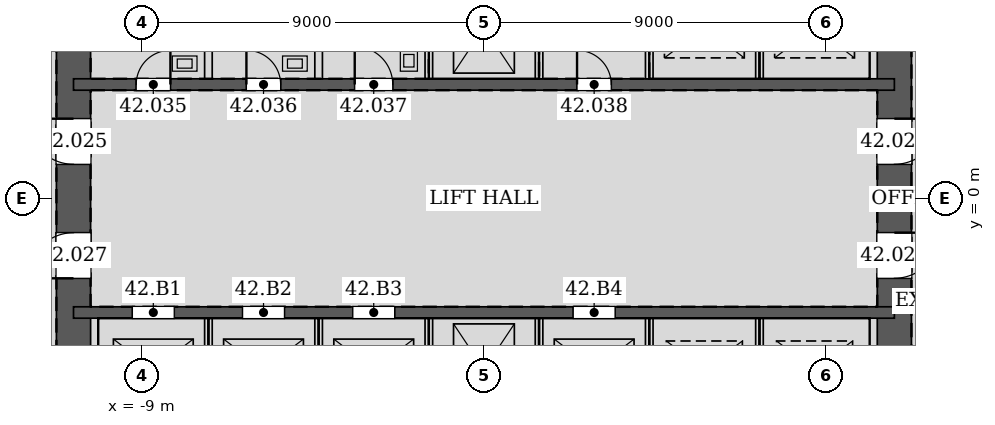
"""IFC4 building model, lengths in metres.
Left out: names, types, materials, properties, quantities, classifications, styles, units other than length and angle.
Written with IfcOpenShell. Run it as: python <this file> out.ifc"""

import sys

from ifc_helpers import new_model, si_unit, direction, frame, frame_2d, origin, place, context, subcontext, project, spatial, rectangle, extrude, element, fill, save


model = new_model("IFC4")
c1 = context("Model", 3, precision=1e-05, world=origin(), true_north=direction((0.0, 1.0)))
c2 = subcontext(c1, "Body", "Model", "MODEL_VIEW")
j1 = project(units=[si_unit("LENGTHUNIT", "METRE"), si_unit("PLANEANGLEUNIT", "RADIAN")], contexts=[c1])
p1 = place(None, origin())
s1 = spatial("IfcSite", under=j1, at=p1, CompositionType="ELEMENT")
p2 = place(p1, origin())
s2 = spatial("IfcBuilding", under=s1, at=p2, CompositionType="ELEMENT")
p3 = place(p2, frame((0.0, 0.0, 184.8)))
s3 = spatial("IfcBuildingStorey", under=s2, at=p3, CompositionType="ELEMENT", Elevation=184.8)
p4 = place(p3, frame((10.8, -10.8, 0.0), z_axis=(0.0, 0.0, 1.0), x_axis=(0.0, 1.0, 0.0)))
e1 = element("IfcWall", 1, at=p4, inside=s3, PredefinedType="SOLIDWALL", context=c2, shape_type="SweptSolid", body=[
    extrude(rectangle(XDim=21.6, YDim=0.9, at=frame_2d((10.8, 0.0))), origin(), (0.0, 0.0, 1.0), 4.2),
])
p5 = place(p4, frame((11.7, 0.0, 0.0)))
e2 = element("IfcOpeningElement", 2, at=p5, cuts=e1, PredefinedType="OPENING", context=c2, shape_type="SweptSolid", body=[
    extrude(rectangle(XDim=1.2, YDim=2.1, at=frame_2d((0.6, 1.05))), frame((0.0, 0.46, 0.0), z_axis=(0.0, -1.0, 0.0), x_axis=(1.0, 0.0, 0.0)), (0.0, 0.0, 1.0), 0.92),
])
p6 = place(p4, frame((8.7, 0.0, 0.0)))
e3 = element("IfcOpeningElement", 3, at=p6, cuts=e1, PredefinedType="OPENING", context=c2, shape_type="SweptSolid", body=[
    extrude(rectangle(XDim=1.2, YDim=2.1, at=frame_2d((0.6, 1.05))), frame((0.0, 0.46, 0.0), z_axis=(0.0, -1.0, 0.0), x_axis=(1.0, 0.0, 0.0)), (0.0, 0.0, 1.0), 0.92),
])
p7 = place(p3, frame((-10.8, 10.8, 0.0), z_axis=(0.0, 0.0, 1.0), x_axis=(0.0, -1.0, 0.0)))
e4 = element("IfcWall", 4, at=p7, inside=s3, PredefinedType="SOLIDWALL", context=c2, shape_type="SweptSolid", body=[
    extrude(rectangle(XDim=21.6, YDim=0.9, at=frame_2d((10.8, 0.0))), origin(), (0.0, 0.0, 1.0), 4.2),
])
p8 = place(p7, frame((8.7, 0.0, 0.0)))
e5 = element("IfcOpeningElement", 5, at=p8, cuts=e4, PredefinedType="OPENING", context=c2, shape_type="SweptSolid", body=[
    extrude(rectangle(XDim=1.2, YDim=2.1, at=frame_2d((0.6, 1.05))), frame((0.0, 0.46, 0.0), z_axis=(0.0, -1.0, 0.0), x_axis=(1.0, 0.0, 0.0)), (0.0, 0.0, 1.0), 0.92),
])
p9 = place(p7, frame((11.7, 0.0, 0.0)))
e6 = element("IfcOpeningElement", 6, at=p9, cuts=e4, PredefinedType="OPENING", context=c2, shape_type="SweptSolid", body=[
    extrude(rectangle(XDim=1.2, YDim=2.1, at=frame_2d((0.6, 1.05))), frame((0.0, 0.46, 0.0), z_axis=(0.0, -1.0, 0.0), x_axis=(1.0, 0.0, 0.0)), (0.0, 0.0, 1.0), 0.92),
])
p10 = place(p3, frame((-10.8, 3.0, 0.0), z_axis=(0.0, 0.0, 1.0), x_axis=(1.0, 0.0, 0.0)))
e7 = element("IfcWall", 7, at=p10, inside=s3, PredefinedType="SOLIDWALL", context=c2, shape_type="SweptSolid", body=[
    extrude(rectangle(XDim=21.6, YDim=0.3, at=frame_2d((10.8, 0.0))), origin(), (0.0, 0.0, 1.0), 4.2),
])
p11 = place(p10, frame((1.65, 0.0, 0.0)))
e8 = element("IfcOpeningElement", 8, at=p11, cuts=e7, PredefinedType="OPENING", context=c2, shape_type="SweptSolid", body=[
    extrude(rectangle(XDim=0.9, YDim=2.1, at=frame_2d((0.45, 1.05))), frame((0.0, 0.16, 0.0), z_axis=(0.0, -1.0, 0.0), x_axis=(1.0, 0.0, 0.0)), (0.0, 0.0, 1.0), 0.32),
])
p12 = place(p10, frame((4.55, 0.0, 0.0)))
e9 = element("IfcOpeningElement", 9, at=p12, cuts=e7, PredefinedType="OPENING", context=c2, shape_type="SweptSolid", body=[
    extrude(rectangle(XDim=0.9, YDim=2.1, at=frame_2d((0.45, 1.05))), frame((0.0, 0.16, 0.0), z_axis=(0.0, -1.0, 0.0), x_axis=(1.0, 0.0, 0.0)), (0.0, 0.0, 1.0), 0.32),
])
p13 = place(p10, frame((7.4, 0.0, 0.0)))
e10 = element("IfcOpeningElement", 10, at=p13, cuts=e7, PredefinedType="OPENING", context=c2, shape_type="SweptSolid", body=[
    extrude(rectangle(XDim=1.0, YDim=2.1, at=frame_2d((0.5, 1.05))), frame((0.0, 0.16, 0.0), z_axis=(0.0, -1.0, 0.0), x_axis=(1.0, 0.0, 0.0)), (0.0, 0.0, 1.0), 0.32),
])
p14 = place(p10, frame((13.25, 0.0, 0.0)))
e11 = element("IfcOpeningElement", 11, at=p14, cuts=e7, PredefinedType="OPENING", context=c2, shape_type="SweptSolid", body=[
    extrude(rectangle(XDim=0.9, YDim=2.1, at=frame_2d((0.45, 1.05))), frame((0.0, 0.16, 0.0), z_axis=(0.0, -1.0, 0.0), x_axis=(1.0, 0.0, 0.0)), (0.0, 0.0, 1.0), 0.32),
])
p15 = place(p3, frame((-10.8, -3.0, 0.0), z_axis=(0.0, 0.0, 1.0), x_axis=(1.0, 0.0, 0.0)))
e12 = element("IfcWall", 12, at=p15, inside=s3, PredefinedType="SOLIDWALL", context=c2, shape_type="SweptSolid", body=[
    extrude(rectangle(XDim=21.6, YDim=0.3, at=frame_2d((10.8, 0.0))), origin(), (0.0, 0.0, 1.0), 4.2),
])
p16 = place(p15, frame((1.55, 0.0, 0.0)))
e13 = element("IfcOpeningElement", 13, at=p16, cuts=e12, PredefinedType="OPENING", context=c2, shape_type="SweptSolid", body=[
    extrude(rectangle(XDim=1.1, YDim=2.1, at=frame_2d((0.55, 1.05))), frame((0.0, 0.16, 0.0), z_axis=(0.0, -1.0, 0.0), x_axis=(1.0, 0.0, 0.0)), (0.0, 0.0, 1.0), 0.32),
])
p17 = place(p15, frame((4.45, 0.0, 0.0)))
e14 = element("IfcOpeningElement", 14, at=p17, cuts=e12, PredefinedType="OPENING", context=c2, shape_type="SweptSolid", body=[
    extrude(rectangle(XDim=1.1, YDim=2.1, at=frame_2d((0.55, 1.05))), frame((0.0, 0.16, 0.0), z_axis=(0.0, -1.0, 0.0), x_axis=(1.0, 0.0, 0.0)), (0.0, 0.0, 1.0), 0.32),
])
p18 = place(p15, frame((7.35, 0.0, 0.0)))
e15 = element("IfcOpeningElement", 15, at=p18, cuts=e12, PredefinedType="OPENING", context=c2, shape_type="SweptSolid", body=[
    extrude(rectangle(XDim=1.1, YDim=2.1, at=frame_2d((0.55, 1.05))), frame((0.0, 0.16, 0.0), z_axis=(0.0, -1.0, 0.0), x_axis=(1.0, 0.0, 0.0)), (0.0, 0.0, 1.0), 0.32),
])
p19 = place(p15, frame((13.15, 0.0, 0.0)))
e16 = element("IfcOpeningElement", 16, at=p19, cuts=e12, PredefinedType="OPENING", context=c2, shape_type="SweptSolid", body=[
    extrude(rectangle(XDim=1.1, YDim=2.1, at=frame_2d((0.55, 1.05))), frame((0.0, 0.16, 0.0), z_axis=(0.0, -1.0, 0.0), x_axis=(1.0, 0.0, 0.0)), (0.0, 0.0, 1.0), 0.32),
])
for number, where, z_axis, x_axis in (
    (17, (-7.25, 3.15, 0.0), (0.0, 0.0, 1.0), (0.0, 1.0, 0.0)),
    (18, (-4.35, 3.15, 0.0), (0.0, 0.0, 1.0), (0.0, 1.0, 0.0)),
    (19, (-1.45, 3.15, 0.0), (0.0, 0.0, 1.0), (0.0, 1.0, 0.0)),
    (20, (1.45, 3.15, 0.0), (0.0, 0.0, 1.0), (0.0, 1.0, 0.0)),
    (21, (4.35, 3.15, 0.0), (0.0, 0.0, 1.0), (0.0, 1.0, 0.0)),
):
    element("IfcWall", number, at=place(p3, frame(where, z_axis=z_axis, x_axis=x_axis)), inside=s3, PredefinedType="PARTITIONING", context=c2, shape_type="SweptSolid", body=[
        extrude(rectangle(XDim=2.7, YDim=0.2, at=frame_2d((1.35, 0.0))), origin(), (0.0, 0.0, 1.0), 3.95),
    ])
for number, where, z_axis, x_axis in (
    (22, (7.25, 3.15, 0.0), (0.0, 0.0, 1.0), (0.0, 1.0, 0.0)),
    (23, (-7.25, -5.85, 0.0), (0.0, 0.0, 1.0), (0.0, 1.0, 0.0)),
    (24, (-4.35, -5.85, 0.0), (0.0, 0.0, 1.0), (0.0, 1.0, 0.0)),
    (25, (-1.45, -5.85, 0.0), (0.0, 0.0, 1.0), (0.0, 1.0, 0.0)),
):
    element("IfcWall", number, at=place(p3, frame(where, z_axis=z_axis, x_axis=x_axis)), inside=s3, PredefinedType="PARTITIONING", context=c2, shape_type="SweptSolid", body=[
        extrude(rectangle(XDim=2.7, YDim=0.2, at=frame_2d((1.35, 0.0))), origin(), (0.0, 0.0, 1.0), 4.2),
    ])
for number, where, z_axis, x_axis in (
    (26, (1.45, -5.85, 0.0), (0.0, 0.0, 1.0), (0.0, 1.0, 0.0)),
    (27, (4.35, -5.85, 0.0), (0.0, 0.0, 1.0), (0.0, 1.0, 0.0)),
):
    element("IfcWall", number, at=place(p3, frame(where, z_axis=z_axis, x_axis=x_axis)), inside=s3, PredefinedType="PARTITIONING", context=c2, shape_type="SweptSolid", body=[
        extrude(rectangle(XDim=2.7, YDim=0.2, at=frame_2d((1.35, 0.0))), origin(), (0.0, 0.0, 1.0), 3.95),
    ])
p20 = place(p3, frame((7.25, -5.85, 0.0), z_axis=(0.0, 0.0, 1.0), x_axis=(0.0, 1.0, 0.0)))
e28 = element("IfcWall", 28, at=p20, inside=s3, PredefinedType="PARTITIONING", context=c2, shape_type="SweptSolid", body=[
    extrude(rectangle(XDim=2.7, YDim=0.2, at=frame_2d((1.35, 0.0))), origin(), (0.0, 0.0, 1.0), 4.2),
])
p21 = place(p5, frame((1.2, 0.0, 0.0), z_axis=(0.0, 0.0, 1.0), x_axis=(-1.0, 0.0, 0.0)))
e29 = element("IfcDoor", 29, at=p21, inside=s3, OperationType="SINGLE_SWING_LEFT", PredefinedType="DOOR", context=c2, shape_type="SweptSolid", body=[
    extrude(rectangle(XDim=1.2, YDim=2.1, at=frame_2d((0.6, 1.05))), frame((0.0, 0.025, 0.0), z_axis=(0.0, -1.0, 0.0), x_axis=(1.0, 0.0, 0.0)), (0.0, 0.0, 1.0), 0.05),
])
fill(e2, e29)
p22 = place(p8, frame((1.2, 0.0, 0.0), z_axis=(0.0, 0.0, 1.0), x_axis=(-1.0, 0.0, 0.0)))
e30 = element("IfcDoor", 30, at=p22, inside=s3, OperationType="SINGLE_SWING_RIGHT", PredefinedType="DOOR", context=c2, shape_type="SweptSolid", body=[
    extrude(rectangle(XDim=1.2, YDim=2.1, at=frame_2d((0.6, 1.05))), frame((0.0, 0.025, 0.0), z_axis=(0.0, -1.0, 0.0), x_axis=(1.0, 0.0, 0.0)), (0.0, 0.0, 1.0), 0.05),
])
fill(e5, e30)
p23 = place(p6, frame((1.2, 0.0, 0.0), z_axis=(0.0, 0.0, 1.0), x_axis=(-1.0, 0.0, 0.0)))
e31 = element("IfcDoor", 31, at=p23, inside=s3, OperationType="SINGLE_SWING_LEFT", PredefinedType="DOOR", context=c2, shape_type="SweptSolid", body=[
    extrude(rectangle(XDim=1.2, YDim=2.1, at=frame_2d((0.6, 1.05))), frame((0.0, 0.025, 0.0), z_axis=(0.0, -1.0, 0.0), x_axis=(1.0, 0.0, 0.0)), (0.0, 0.0, 1.0), 0.05),
])
fill(e3, e31)
p24 = place(p9, frame((1.2, 0.0, 0.0), z_axis=(0.0, 0.0, 1.0), x_axis=(-1.0, 0.0, 0.0)))
e32 = element("IfcDoor", 32, at=p24, inside=s3, OperationType="SINGLE_SWING_LEFT", PredefinedType="DOOR", context=c2, shape_type="SweptSolid", body=[
    extrude(rectangle(XDim=1.2, YDim=2.1, at=frame_2d((0.6, 1.05))), frame((0.0, 0.025, 0.0), z_axis=(0.0, -1.0, 0.0), x_axis=(1.0, 0.0, 0.0)), (0.0, 0.0, 1.0), 0.05),
])
fill(e6, e32)
p25 = place(p11, origin())
e33 = element("IfcDoor", 33, at=p25, inside=s3, OperationType="SINGLE_SWING_RIGHT", PredefinedType="DOOR", context=c2, shape_type="SweptSolid", body=[
    extrude(rectangle(XDim=0.9, YDim=2.1, at=frame_2d((0.45, 1.05))), frame((0.0, 0.025, 0.0), z_axis=(0.0, -1.0, 0.0), x_axis=(1.0, 0.0, 0.0)), (0.0, 0.0, 1.0), 0.05),
])
fill(e8, e33)
p26 = place(p12, origin())
e34 = element("IfcDoor", 34, at=p26, inside=s3, OperationType="SINGLE_SWING_LEFT", PredefinedType="DOOR", context=c2, shape_type="SweptSolid", body=[
    extrude(rectangle(XDim=0.9, YDim=2.1, at=frame_2d((0.45, 1.05))), frame((0.0, 0.025, 0.0), z_axis=(0.0, -1.0, 0.0), x_axis=(1.0, 0.0, 0.0)), (0.0, 0.0, 1.0), 0.05),
])
fill(e9, e34)
p27 = place(p13, origin())
e35 = element("IfcDoor", 35, at=p27, inside=s3, OperationType="SINGLE_SWING_LEFT", PredefinedType="DOOR", context=c2, shape_type="SweptSolid", body=[
    extrude(rectangle(XDim=1.0, YDim=2.1, at=frame_2d((0.5, 1.05))), frame((0.0, 0.025, 0.0), z_axis=(0.0, -1.0, 0.0), x_axis=(1.0, 0.0, 0.0)), (0.0, 0.0, 1.0), 0.05),
])
fill(e10, e35)
p28 = place(p14, origin())
e36 = element("IfcDoor", 36, at=p28, inside=s3, OperationType="SINGLE_SWING_LEFT", PredefinedType="DOOR", context=c2, shape_type="SweptSolid", body=[
    extrude(rectangle(XDim=0.9, YDim=2.1, at=frame_2d((0.45, 1.05))), frame((0.0, 0.025, 0.0), z_axis=(0.0, -1.0, 0.0), x_axis=(1.0, 0.0, 0.0)), (0.0, 0.0, 1.0), 0.05),
])
fill(e11, e36)
p29 = place(p16, origin())
e37 = element("IfcDoor", 37, at=p29, inside=s3, OperationType="DOUBLE_DOOR_SLIDING", PredefinedType="DOOR", context=c2, shape_type="SweptSolid", body=[
    extrude(rectangle(XDim=1.1, YDim=2.1, at=frame_2d((0.55, 1.05))), frame((0.0, 0.025, 0.0), z_axis=(0.0, -1.0, 0.0), x_axis=(1.0, 0.0, 0.0)), (0.0, 0.0, 1.0), 0.05),
])
fill(e13, e37)
p30 = place(p17, origin())
e38 = element("IfcDoor", 38, at=p30, inside=s3, OperationType="DOUBLE_DOOR_SLIDING", PredefinedType="DOOR", context=c2, shape_type="SweptSolid", body=[
    extrude(rectangle(XDim=1.1, YDim=2.1, at=frame_2d((0.55, 1.05))), frame((0.0, 0.025, 0.0), z_axis=(0.0, -1.0, 0.0), x_axis=(1.0, 0.0, 0.0)), (0.0, 0.0, 1.0), 0.05),
])
fill(e14, e38)
p31 = place(p18, origin())
e39 = element("IfcDoor", 39, at=p31, inside=s3, OperationType="DOUBLE_DOOR_SLIDING", PredefinedType="DOOR", context=c2, shape_type="SweptSolid", body=[
    extrude(rectangle(XDim=1.1, YDim=2.1, at=frame_2d((0.55, 1.05))), frame((0.0, 0.025, 0.0), z_axis=(0.0, -1.0, 0.0), x_axis=(1.0, 0.0, 0.0)), (0.0, 0.0, 1.0), 0.05),
])
fill(e15, e39)
p32 = place(p19, origin())
e40 = element("IfcDoor", 40, at=p32, inside=s3, OperationType="DOUBLE_DOOR_SLIDING", PredefinedType="DOOR", context=c2, shape_type="SweptSolid", body=[
    extrude(rectangle(XDim=1.1, YDim=2.1, at=frame_2d((0.55, 1.05))), frame((0.0, 0.025, 0.0), z_axis=(0.0, -1.0, 0.0), x_axis=(1.0, 0.0, 0.0)), (0.0, 0.0, 1.0), 0.05),
])
fill(e16, e40)
save(model, sys.argv[1])
